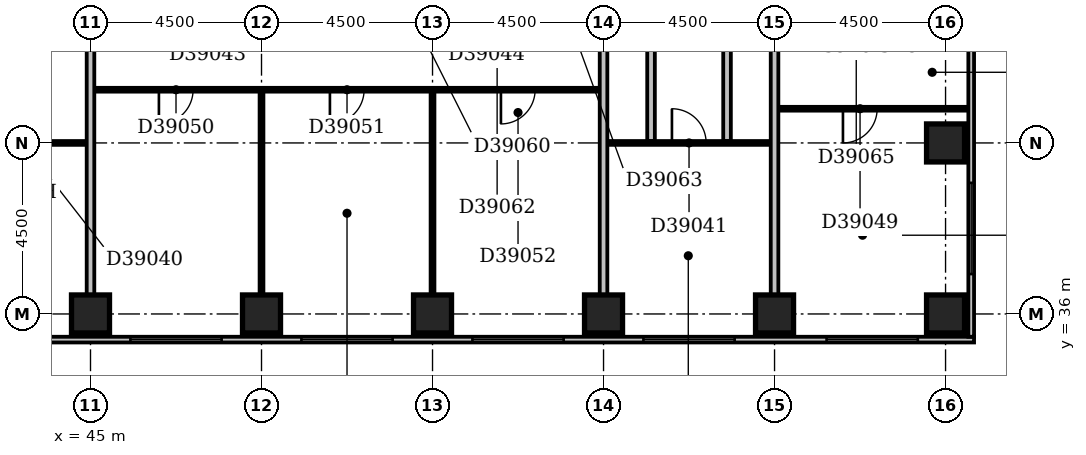
"""IFC4 building model, lengths in metres.
Left out: names, types, materials, properties, quantities, classifications, styles, units other than length and angle.
Written with IfcOpenShell. Run it as: python <this file> out.ifc"""

import sys

from ifc_helpers import new_model, si_unit, direction, frame, frame_2d, origin, origin_2d, place, context, subcontext, project, spatial, rectangle, extrude, element, fill, save


model = new_model("IFC4")
c1 = context("Model", 3, precision=1e-05, world=origin(), true_north=direction((0.0, 1.0)))
c2 = subcontext(c1, "Body", "Model", "MODEL_VIEW")
j1 = project(units=[si_unit("LENGTHUNIT", "METRE"), si_unit("PLANEANGLEUNIT", "RADIAN")], contexts=[c1])
p1 = place(None, origin())
s1 = spatial("IfcSite", under=j1, at=p1, CompositionType="ELEMENT")
p2 = place(p1, origin())
s2 = spatial("IfcBuilding", under=s1, at=p2, CompositionType="ELEMENT")
p3 = place(p2, frame((0.0, 0.0, 155.6)))
s3 = spatial("IfcBuildingStorey", under=s2, at=p3, CompositionType="ELEMENT", Elevation=155.6)
for number, where, z_axis, x_axis in (
    (1, (45.0, 36.0, -0.3), (0.0, 0.0, 1.0), (1.0, 0.0, 0.0)),
    (2, (49.5, 36.0, -0.3), (0.0, 0.0, 1.0), (1.0, 0.0, 0.0)),
    (3, (54.0, 36.0, -0.3), (0.0, 0.0, 1.0), (1.0, 0.0, 0.0)),
    (4, (58.5, 36.0, -0.3), (0.0, 0.0, 1.0), (1.0, 0.0, 0.0)),
    (5, (63.0, 36.0, -0.3), (0.0, 0.0, 1.0), (1.0, 0.0, 0.0)),
    (6, (67.5, 36.0, -0.3), (0.0, 0.0, 1.0), (1.0, 0.0, 0.0)),
    (7, (67.5, 40.5, -0.3), (0.0, 0.0, 1.0), (1.0, 0.0, 0.0)),
):
    element("IfcColumn", number, at=place(p3, frame(where, z_axis=z_axis, x_axis=x_axis)), inside=s3, PredefinedType="COLUMN", context=c2, shape_type="SweptSolid", body=[
        extrude(rectangle(XDim=1.0, YDim=1.0, at=origin_2d()), origin(), (0.0, 0.0, 1.0), 3.6),
    ])
p4 = place(p3, frame((23.1, 35.325, 0.0), z_axis=(0.0, 0.0, 1.0), x_axis=(1.0, 0.0, 0.0)))
e8 = element("IfcWall", 8, at=p4, inside=s3, PredefinedType="STANDARD", context=c2, shape_type="SweptSolid", body=[
    extrude(rectangle(XDim=45.15, YDim=0.15, at=frame_2d((22.575, 0.0))), origin(), (0.0, 0.0, 1.0), 2.7),
])
p5 = place(p4, frame((0.45, 0.0, 0.6)))
e9 = element("IfcOpeningElement", 9, at=p5, cuts=e8, PredefinedType="OPENING", context=c2, shape_type="SweptSolid", body=[
    extrude(rectangle(XDim=2.4, YDim=1.8, at=frame_2d((1.2, 0.9))), frame((0.0, 0.087, 0.0), z_axis=(0.0, -1.0, 0.0), x_axis=(1.0, 0.0, 0.0)), (0.0, 0.0, 1.0), 0.174),
])
p6 = place(p4, frame((4.95, 0.0, 0.6)))
e10 = element("IfcOpeningElement", 10, at=p6, cuts=e8, PredefinedType="OPENING", context=c2, shape_type="SweptSolid", body=[
    extrude(rectangle(XDim=2.4, YDim=1.8, at=frame_2d((1.2, 0.9))), frame((0.0, 0.087, 0.0), z_axis=(0.0, -1.0, 0.0), x_axis=(1.0, 0.0, 0.0)), (0.0, 0.0, 1.0), 0.174),
])
p7 = place(p4, frame((10.893, 0.0, 0.6)))
e11 = element("IfcOpeningElement", 11, at=p7, cuts=e8, PredefinedType="OPENING", context=c2, shape_type="SweptSolid", body=[
    extrude(rectangle(XDim=1.2, YDim=1.8, at=frame_2d((0.6, 0.9))), frame((0.0, 0.087, 0.0), z_axis=(0.0, -1.0, 0.0), x_axis=(1.0, 0.0, 0.0)), (0.0, 0.0, 1.0), 0.174),
])
p8 = place(p4, frame((13.653, 0.0, 0.6)))
e12 = element("IfcOpeningElement", 12, at=p8, cuts=e8, PredefinedType="OPENING", context=c2, shape_type="SweptSolid", body=[
    extrude(rectangle(XDim=1.5, YDim=1.8, at=frame_2d((0.75, 0.9))), frame((0.0, 0.087, 0.0), z_axis=(0.0, -1.0, 0.0), x_axis=(1.0, 0.0, 0.0)), (0.0, 0.0, 1.0), 0.174),
])
p9 = place(p4, frame((18.45, 0.0, 0.6)))
e13 = element("IfcOpeningElement", 13, at=p9, cuts=e8, PredefinedType="OPENING", context=c2, shape_type="SweptSolid", body=[
    extrude(rectangle(XDim=2.4, YDim=1.8, at=frame_2d((1.2, 0.9))), frame((0.0, 0.087, 0.0), z_axis=(0.0, -1.0, 0.0), x_axis=(1.0, 0.0, 0.0)), (0.0, 0.0, 1.0), 0.174),
])
p10 = place(p4, frame((22.95, 0.0, 0.6)))
e14 = element("IfcOpeningElement", 14, at=p10, cuts=e8, PredefinedType="OPENING", context=c2, shape_type="SweptSolid", body=[
    extrude(rectangle(XDim=2.4, YDim=1.8, at=frame_2d((1.2, 0.9))), frame((0.0, 0.087, 0.0), z_axis=(0.0, -1.0, 0.0), x_axis=(1.0, 0.0, 0.0)), (0.0, 0.0, 1.0), 0.174),
])
p11 = place(p4, frame((27.45, 0.0, 0.6)))
e15 = element("IfcOpeningElement", 15, at=p11, cuts=e8, PredefinedType="OPENING", context=c2, shape_type="SweptSolid", body=[
    extrude(rectangle(XDim=2.4, YDim=1.8, at=frame_2d((1.2, 0.9))), frame((0.0, 0.087, 0.0), z_axis=(0.0, -1.0, 0.0), x_axis=(1.0, 0.0, 0.0)), (0.0, 0.0, 1.0), 0.174),
])
p12 = place(p4, frame((31.95, 0.0, 0.6)))
e16 = element("IfcOpeningElement", 16, at=p12, cuts=e8, PredefinedType="OPENING", context=c2, shape_type="SweptSolid", body=[
    extrude(rectangle(XDim=2.4, YDim=1.8, at=frame_2d((1.2, 0.9))), frame((0.0, 0.087, 0.0), z_axis=(0.0, -1.0, 0.0), x_axis=(1.0, 0.0, 0.0)), (0.0, 0.0, 1.0), 0.174),
])
p13 = place(p4, frame((36.45, 0.0, 0.6)))
e17 = element("IfcOpeningElement", 17, at=p13, cuts=e8, PredefinedType="OPENING", context=c2, shape_type="SweptSolid", body=[
    extrude(rectangle(XDim=2.4, YDim=1.8, at=frame_2d((1.2, 0.9))), frame((0.0, 0.087, 0.0), z_axis=(0.0, -1.0, 0.0), x_axis=(1.0, 0.0, 0.0)), (0.0, 0.0, 1.0), 0.174),
])
p14 = place(p4, frame((41.27, 0.0, 0.6)))
e18 = element("IfcOpeningElement", 18, at=p14, cuts=e8, PredefinedType="OPENING", context=c2, shape_type="SweptSolid", body=[
    extrude(rectangle(XDim=2.4, YDim=1.8, at=frame_2d((1.2, 0.9))), frame((0.0, 0.087, 0.0), z_axis=(0.0, -1.0, 0.0), x_axis=(1.0, 0.0, 0.0)), (0.0, 0.0, 1.0), 0.174),
])
p15 = place(p3, frame((68.175, 35.4, 0.0), z_axis=(0.0, 0.0, 1.0), x_axis=(0.0, 1.0, 0.0)))
e19 = element("IfcWall", 19, at=p15, inside=s3, PredefinedType="STANDARD", context=c2, shape_type="SweptSolid", body=[
    extrude(rectangle(XDim=23.85, YDim=0.15, at=frame_2d((11.925, 0.0))), origin(), (0.0, 0.0, 1.0), 2.7),
])
p16 = place(p15, frame((1.65, 0.0, 0.6)))
e20 = element("IfcOpeningElement", 20, at=p16, cuts=e19, PredefinedType="OPENING", context=c2, shape_type="SweptSolid", body=[
    extrude(rectangle(XDim=2.4, YDim=1.8, at=frame_2d((1.2, 0.9))), frame((0.0, 0.087, 0.0), z_axis=(0.0, -1.0, 0.0), x_axis=(1.0, 0.0, 0.0)), (0.0, 0.0, 1.0), 0.174),
])
p17 = place(p15, frame((19.65, 0.0, 0.6)))
e21 = element("IfcOpeningElement", 21, at=p17, cuts=e19, PredefinedType="OPENING", context=c2, shape_type="SweptSolid", body=[
    extrude(rectangle(XDim=2.4, YDim=1.8, at=frame_2d((1.2, 0.9))), frame((0.0, 0.087, 0.0), z_axis=(0.0, -1.0, 0.0), x_axis=(1.0, 0.0, 0.0)), (0.0, 0.0, 1.0), 0.174),
])
p18 = place(p3, frame((45.0, 36.5, 0.0), z_axis=(0.0, 0.0, 1.0), x_axis=(0.0, 1.0, 0.0)))
e22 = element("IfcWall", 22, at=p18, inside=s3, PredefinedType="PARTITIONING", context=c2, shape_type="SweptSolid", body=[
    extrude(rectangle(XDim=12.9, YDim=0.2, at=frame_2d((6.45, 0.0))), origin(), (0.0, 0.0, 1.0), 2.6),
])
p19 = place(p3, frame((49.5, 36.5, 0.0), z_axis=(0.0, 0.0, 1.0), x_axis=(0.0, 1.0, 0.0)))
e23 = element("IfcWall", 23, at=p19, inside=s3, PredefinedType="PARTITIONING", context=c2, shape_type="SweptSolid", body=[
    extrude(rectangle(XDim=5.35, YDim=0.1, at=frame_2d((2.675, 0.0))), origin(), (0.0, 0.0, 1.0), 3.3),
])
p20 = place(p3, frame((54.0, 36.5, 0.0), z_axis=(0.0, 0.0, 1.0), x_axis=(0.0, 1.0, 0.0)))
e24 = element("IfcWall", 24, at=p20, inside=s3, PredefinedType="PARTITIONING", context=c2, shape_type="SweptSolid", body=[
    extrude(rectangle(XDim=5.35, YDim=0.1, at=frame_2d((2.675, 0.0))), origin(), (0.0, 0.0, 1.0), 2.6),
])
p21 = place(p3, frame((58.5, 36.5, 0.0), z_axis=(0.0, 0.0, 1.0), x_axis=(0.0, 1.0, 0.0)))
e25 = element("IfcWall", 25, at=p21, inside=s3, PredefinedType="PARTITIONING", context=c2, shape_type="SweptSolid", body=[
    extrude(rectangle(XDim=12.9, YDim=0.2, at=frame_2d((6.45, 0.0))), origin(), (0.0, 0.0, 1.0), 3.3),
])
p22 = place(p3, frame((63.0, 36.5, 0.0), z_axis=(0.0, 0.0, 1.0), x_axis=(0.0, 1.0, 0.0)))
e26 = element("IfcWall", 26, at=p22, inside=s3, PredefinedType="PARTITIONING", context=c2, shape_type="SweptSolid", body=[
    extrude(rectangle(XDim=12.9, YDim=0.2, at=frame_2d((6.45, 0.0))), origin(), (0.0, 0.0, 1.0), 2.4),
])
p23 = place(p3, frame((40.6, 40.5, 0.0), z_axis=(0.0, 0.0, 1.0), x_axis=(1.0, 0.0, 0.0)))
e27 = element("IfcWall", 27, at=p23, inside=s3, PredefinedType="PARTITIONING", context=c2, shape_type="SweptSolid", body=[
    extrude(rectangle(XDim=4.3, YDim=0.1, at=frame_2d((2.15, 0.0))), origin(), (0.0, 0.0, 1.0), 3.3),
])
p24 = place(p23, frame((1.7, 0.0, 0.0)))
e28 = element("IfcOpeningElement", 28, at=p24, cuts=e27, PredefinedType="OPENING", context=c2, shape_type="SweptSolid", body=[
    extrude(rectangle(XDim=0.9, YDim=2.1, at=frame_2d((0.45, 1.05))), frame((0.0, 0.062, 0.0), z_axis=(0.0, -1.0, 0.0), x_axis=(1.0, 0.0, 0.0)), (0.0, 0.0, 1.0), 0.124),
])
p25 = place(p3, frame((58.6, 40.5, 0.0), z_axis=(0.0, 0.0, 1.0), x_axis=(1.0, 0.0, 0.0)))
e29 = element("IfcWall", 29, at=p25, inside=s3, PredefinedType="PARTITIONING", context=c2, shape_type="SweptSolid", body=[
    extrude(rectangle(XDim=4.3, YDim=0.1, at=frame_2d((2.15, 0.0))), origin(), (0.0, 0.0, 1.0), 3.3),
])
p26 = place(p25, frame((1.7, 0.0, 0.0)))
e30 = element("IfcOpeningElement", 30, at=p26, cuts=e29, PredefinedType="OPENING", context=c2, shape_type="SweptSolid", body=[
    extrude(rectangle(XDim=0.9, YDim=2.1, at=frame_2d((0.45, 1.05))), frame((0.0, 0.062, 0.0), z_axis=(0.0, -1.0, 0.0), x_axis=(1.0, 0.0, 0.0)), (0.0, 0.0, 1.0), 0.124),
])
p27 = place(p3, frame((59.75, 40.55, 0.0), z_axis=(0.0, 0.0, 1.0), x_axis=(0.0, 1.0, 0.0)))
e31 = element("IfcWall", 31, at=p27, inside=s3, PredefinedType="PARTITIONING", context=c2, shape_type="SweptSolid", body=[
    extrude(rectangle(XDim=8.95, YDim=0.2, at=frame_2d((4.475, 0.0))), origin(), (0.0, 0.0, 1.0), 3.3),
])
p28 = place(p27, frame((5.55, 0.0, 0.0)))
e32 = element("IfcOpeningElement", 32, at=p28, cuts=e31, PredefinedType="OPENING", context=c2, shape_type="SweptSolid", body=[
    extrude(rectangle(XDim=0.8, YDim=2.1, at=frame_2d((0.4, 1.05))), frame((0.0, 0.112, 0.0), z_axis=(0.0, -1.0, 0.0), x_axis=(1.0, 0.0, 0.0)), (0.0, 0.0, 1.0), 0.224),
])
p29 = place(p3, frame((61.75, 40.55, 0.0), z_axis=(0.0, 0.0, 1.0), x_axis=(0.0, 1.0, 0.0)))
e33 = element("IfcWall", 33, at=p29, inside=s3, PredefinedType="PARTITIONING", context=c2, shape_type="SweptSolid", body=[
    extrude(rectangle(XDim=8.95, YDim=0.2, at=frame_2d((4.475, 0.0))), origin(), (0.0, 0.0, 1.0), 3.3),
])
p30 = place(p29, frame((5.55, 0.0, 0.0)))
e34 = element("IfcOpeningElement", 34, at=p30, cuts=e33, PredefinedType="OPENING", context=c2, shape_type="SweptSolid", body=[
    extrude(rectangle(XDim=0.8, YDim=2.1, at=frame_2d((0.4, 1.05))), frame((0.0, 0.112, 0.0), z_axis=(0.0, -1.0, 0.0), x_axis=(1.0, 0.0, 0.0)), (0.0, 0.0, 1.0), 0.224),
])
p31 = place(p3, frame((63.1, 41.4, 0.0), z_axis=(0.0, 0.0, 1.0), x_axis=(1.0, 0.0, 0.0)))
e35 = element("IfcWall", 35, at=p31, inside=s3, PredefinedType="PARTITIONING", context=c2, shape_type="SweptSolid", body=[
    extrude(rectangle(XDim=5.0, YDim=0.1, at=frame_2d((2.5, 0.0))), origin(), (0.0, 0.0, 1.0), 3.3),
])
p32 = place(p31, frame((1.7, 0.0, 0.0)))
e36 = element("IfcOpeningElement", 36, at=p32, cuts=e35, PredefinedType="OPENING", context=c2, shape_type="SweptSolid", body=[
    extrude(rectangle(XDim=0.9, YDim=2.1, at=frame_2d((0.45, 1.05))), frame((0.0, 0.062, 0.0), z_axis=(0.0, -1.0, 0.0), x_axis=(1.0, 0.0, 0.0)), (0.0, 0.0, 1.0), 0.124),
])
p33 = place(p3, frame((45.1, 41.9, 0.0), z_axis=(0.0, 0.0, 1.0), x_axis=(1.0, 0.0, 0.0)))
e37 = element("IfcWall", 37, at=p33, inside=s3, PredefinedType="PARTITIONING", context=c2, shape_type="SweptSolid", body=[
    extrude(rectangle(XDim=13.3, YDim=0.1, at=frame_2d((6.65, 0.0))), origin(), (0.0, 0.0, 1.0), 3.3),
])
p34 = place(p33, frame((1.7, 0.0, 0.0)))
e38 = element("IfcOpeningElement", 38, at=p34, cuts=e37, PredefinedType="OPENING", context=c2, shape_type="SweptSolid", body=[
    extrude(rectangle(XDim=0.9, YDim=2.1, at=frame_2d((0.45, 1.05))), frame((0.0, 0.062, 0.0), z_axis=(0.0, -1.0, 0.0), x_axis=(1.0, 0.0, 0.0)), (0.0, 0.0, 1.0), 0.124),
])
p35 = place(p33, frame((6.2, 0.0, 0.0)))
e39 = element("IfcOpeningElement", 39, at=p35, cuts=e37, PredefinedType="OPENING", context=c2, shape_type="SweptSolid", body=[
    extrude(rectangle(XDim=0.9, YDim=2.1, at=frame_2d((0.45, 1.05))), frame((0.0, 0.062, 0.0), z_axis=(0.0, -1.0, 0.0), x_axis=(1.0, 0.0, 0.0)), (0.0, 0.0, 1.0), 0.124),
])
p36 = place(p33, frame((10.7, 0.0, 0.0)))
e40 = element("IfcOpeningElement", 40, at=p36, cuts=e37, PredefinedType="OPENING", context=c2, shape_type="SweptSolid", body=[
    extrude(rectangle(XDim=0.9, YDim=2.1, at=frame_2d((0.45, 1.05))), frame((0.0, 0.062, 0.0), z_axis=(0.0, -1.0, 0.0), x_axis=(1.0, 0.0, 0.0)), (0.0, 0.0, 1.0), 0.124),
])
p37 = place(p10, origin())
e41 = element("IfcWindow", 41, at=p37, inside=s3, PartitioningType="SINGLE_PANEL", PredefinedType="WINDOW", context=c2, shape_type="SweptSolid", body=[
    extrude(rectangle(XDim=2.4, YDim=1.8, at=frame_2d((1.2, 0.9))), frame((0.0, 0.03, 0.0), z_axis=(0.0, -1.0, 0.0), x_axis=(1.0, 0.0, 0.0)), (0.0, 0.0, 1.0), 0.06),
])
fill(e14, e41)
p38 = place(p11, origin())
e42 = element("IfcWindow", 42, at=p38, inside=s3, PartitioningType="SINGLE_PANEL", PredefinedType="WINDOW", context=c2, shape_type="SweptSolid", body=[
    extrude(rectangle(XDim=2.4, YDim=1.8, at=frame_2d((1.2, 0.9))), frame((0.0, 0.03, 0.0), z_axis=(0.0, -1.0, 0.0), x_axis=(1.0, 0.0, 0.0)), (0.0, 0.0, 1.0), 0.06),
])
fill(e15, e42)
p39 = place(p12, origin())
e43 = element("IfcWindow", 43, at=p39, inside=s3, PartitioningType="SINGLE_PANEL", PredefinedType="WINDOW", context=c2, shape_type="SweptSolid", body=[
    extrude(rectangle(XDim=2.4, YDim=1.8, at=frame_2d((1.2, 0.9))), frame((0.0, 0.03, 0.0), z_axis=(0.0, -1.0, 0.0), x_axis=(1.0, 0.0, 0.0)), (0.0, 0.0, 1.0), 0.06),
])
fill(e16, e43)
p40 = place(p13, origin())
e44 = element("IfcWindow", 44, at=p40, inside=s3, PartitioningType="SINGLE_PANEL", PredefinedType="WINDOW", context=c2, shape_type="SweptSolid", body=[
    extrude(rectangle(XDim=2.4, YDim=1.8, at=frame_2d((1.2, 0.9))), frame((0.0, 0.03, 0.0), z_axis=(0.0, -1.0, 0.0), x_axis=(1.0, 0.0, 0.0)), (0.0, 0.0, 1.0), 0.06),
])
fill(e17, e44)
p41 = place(p14, origin())
e45 = element("IfcWindow", 45, at=p41, inside=s3, PartitioningType="SINGLE_PANEL", PredefinedType="WINDOW", context=c2, shape_type="SweptSolid", body=[
    extrude(rectangle(XDim=2.4, YDim=1.8, at=frame_2d((1.2, 0.9))), frame((0.0, 0.03, 0.0), z_axis=(0.0, -1.0, 0.0), x_axis=(1.0, 0.0, 0.0)), (0.0, 0.0, 1.0), 0.06),
])
fill(e18, e45)
p42 = place(p16, origin())
e46 = element("IfcWindow", 46, at=p42, inside=s3, PartitioningType="SINGLE_PANEL", PredefinedType="WINDOW", context=c2, shape_type="SweptSolid", body=[
    extrude(rectangle(XDim=2.4, YDim=1.8, at=frame_2d((1.2, 0.9))), frame((0.0, 0.03, 0.0), z_axis=(0.0, -1.0, 0.0), x_axis=(1.0, 0.0, 0.0)), (0.0, 0.0, 1.0), 0.06),
])
fill(e20, e46)
p43 = place(p26, origin())
e47 = element("IfcDoor", 47, at=p43, inside=s3, OperationType="SINGLE_SWING_LEFT", PredefinedType="DOOR", context=c2, shape_type="SweptSolid", body=[
    extrude(rectangle(XDim=0.9, YDim=2.1, at=frame_2d((0.45, 1.05))), frame((0.0, 0.025, 0.0), z_axis=(0.0, -1.0, 0.0), x_axis=(1.0, 0.0, 0.0)), (0.0, 0.0, 1.0), 0.05),
])
fill(e30, e47)
p44 = place(p32, frame((0.9, 0.0, 0.0), z_axis=(0.0, 0.0, 1.0), x_axis=(-1.0, 0.0, 0.0)))
e48 = element("IfcDoor", 48, at=p44, inside=s3, OperationType="SINGLE_SWING_RIGHT", PredefinedType="DOOR", context=c2, shape_type="SweptSolid", body=[
    extrude(rectangle(XDim=0.9, YDim=2.1, at=frame_2d((0.45, 1.05))), frame((0.0, 0.025, 0.0), z_axis=(0.0, -1.0, 0.0), x_axis=(1.0, 0.0, 0.0)), (0.0, 0.0, 1.0), 0.05),
])
fill(e36, e48)
p45 = place(p34, frame((0.9, 0.0, 0.0), z_axis=(0.0, 0.0, 1.0), x_axis=(-1.0, 0.0, 0.0)))
e49 = element("IfcDoor", 49, at=p45, inside=s3, OperationType="SINGLE_SWING_RIGHT", PredefinedType="DOOR", context=c2, shape_type="SweptSolid", body=[
    extrude(rectangle(XDim=0.9, YDim=2.1, at=frame_2d((0.45, 1.05))), frame((0.0, 0.025, 0.0), z_axis=(0.0, -1.0, 0.0), x_axis=(1.0, 0.0, 0.0)), (0.0, 0.0, 1.0), 0.05),
])
fill(e38, e49)
p46 = place(p35, frame((0.9, 0.0, 0.0), z_axis=(0.0, 0.0, 1.0), x_axis=(-1.0, 0.0, 0.0)))
e50 = element("IfcDoor", 50, at=p46, inside=s3, OperationType="SINGLE_SWING_RIGHT", PredefinedType="DOOR", context=c2, shape_type="SweptSolid", body=[
    extrude(rectangle(XDim=0.9, YDim=2.1, at=frame_2d((0.45, 1.05))), frame((0.0, 0.025, 0.0), z_axis=(0.0, -1.0, 0.0), x_axis=(1.0, 0.0, 0.0)), (0.0, 0.0, 1.0), 0.05),
])
fill(e39, e50)
p47 = place(p36, frame((0.9, 0.0, 0.0), z_axis=(0.0, 0.0, 1.0), x_axis=(-1.0, 0.0, 0.0)))
e51 = element("IfcDoor", 51, at=p47, inside=s3, OperationType="SINGLE_SWING_RIGHT", PredefinedType="DOOR", context=c2, shape_type="SweptSolid", body=[
    extrude(rectangle(XDim=0.9, YDim=2.1, at=frame_2d((0.45, 1.05))), frame((0.0, 0.025, 0.0), z_axis=(0.0, -1.0, 0.0), x_axis=(1.0, 0.0, 0.0)), (0.0, 0.0, 1.0), 0.05),
])
fill(e40, e51)
save(model, sys.argv[1])
